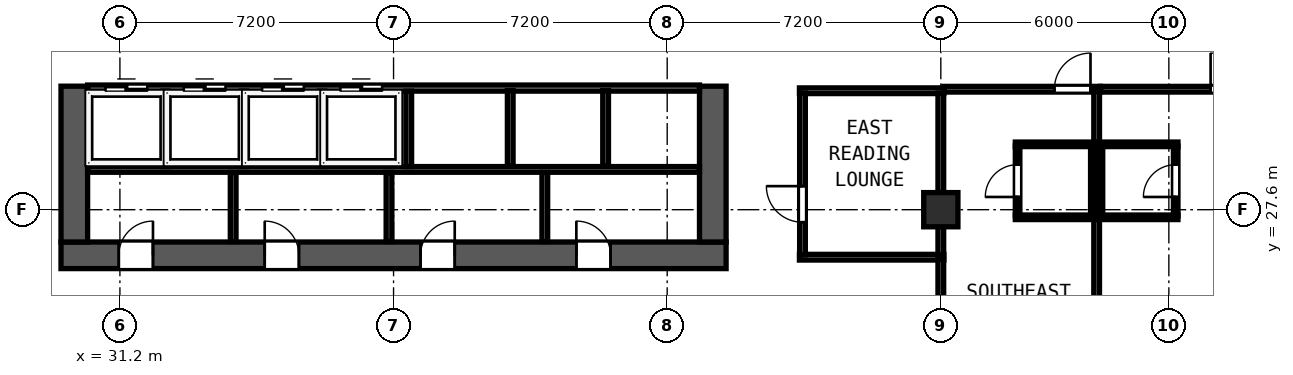
"""IFC4 building model, lengths in metres.
Left out: names, types, materials, properties, quantities, classifications, styles, units other than length and angle.
Written with IfcOpenShell. Run it as: python <this file> out.ifc"""

import sys

from ifc_helpers import new_model, si_unit, direction, frame, frame_2d, origin, origin_2d, place, context, subcontext, project, spatial, rectangle, hollow_rectangle, extrude, element, fill, save


model = new_model("IFC4")
c1 = context("Model", 3, precision=1e-05, world=origin(), true_north=direction((0.0, 1.0)))
c2 = subcontext(c1, "Body", "Model", "MODEL_VIEW")
j1 = project(units=[si_unit("LENGTHUNIT", "METRE"), si_unit("PLANEANGLEUNIT", "RADIAN")], contexts=[c1])
p1 = place(None, origin())
s1 = spatial("IfcSite", under=j1, at=p1, CompositionType="ELEMENT")
p2 = place(p1, origin())
s2 = spatial("IfcBuilding", under=s1, at=p2, CompositionType="ELEMENT")
p3 = place(p2, frame((0.0, 0.0, 152.4)))
s3 = spatial("IfcBuildingStorey", under=s2, at=p3, CompositionType="ELEMENT", Elevation=152.4)
p4 = place(p3, frame((29.65, 26.4, 0.0), z_axis=(0.0, 0.0, 1.0), x_axis=(1.0, 0.0, 0.0)))
e1 = element("IfcWall", 1, at=p4, inside=s3, PredefinedType="SHEAR", context=c2, shape_type="SweptSolid", body=[
    extrude(rectangle(XDim=17.5, YDim=0.7, at=frame_2d((8.75, 0.0))), origin(), (0.0, 0.0, 1.0), 3.6),
])
p5 = place(p4, frame((2.42, 0.0, 0.0), z_axis=(0.0, 0.0, 1.0), x_axis=(-1.0, 0.0, 0.0)))
e2 = element("IfcOpeningElement", 2, at=p5, cuts=e1, PredefinedType="OPENING", context=c2, shape_type="SweptSolid", body=[
    extrude(rectangle(XDim=0.9, YDim=2.1, at=frame_2d((0.45, 1.05))), frame((0.0, 0.36, 0.0), z_axis=(0.0, -1.0, 0.0), x_axis=(1.0, 0.0, 0.0)), (0.0, 0.0, 1.0), 0.72),
])
p6 = place(p4, frame((6.26, 0.0, 0.0), z_axis=(0.0, 0.0, 1.0), x_axis=(-1.0, 0.0, 0.0)))
e3 = element("IfcOpeningElement", 3, at=p6, cuts=e1, PredefinedType="OPENING", context=c2, shape_type="SweptSolid", body=[
    extrude(rectangle(XDim=0.9, YDim=2.1, at=frame_2d((0.45, 1.05))), frame((0.0, 0.36, 0.0), z_axis=(0.0, -1.0, 0.0), x_axis=(1.0, 0.0, 0.0)), (0.0, 0.0, 1.0), 0.72),
])
p7 = place(p4, frame((10.36, 0.0, 0.0), z_axis=(0.0, 0.0, 1.0), x_axis=(-1.0, 0.0, 0.0)))
e4 = element("IfcOpeningElement", 4, at=p7, cuts=e1, PredefinedType="OPENING", context=c2, shape_type="SweptSolid", body=[
    extrude(rectangle(XDim=0.9, YDim=2.1, at=frame_2d((0.45, 1.05))), frame((0.0, 0.36, 0.0), z_axis=(0.0, -1.0, 0.0), x_axis=(1.0, 0.0, 0.0)), (0.0, 0.0, 1.0), 0.72),
])
p8 = place(p4, frame((14.46, 0.0, 0.0), z_axis=(0.0, 0.0, 1.0), x_axis=(-1.0, 0.0, 0.0)))
e5 = element("IfcOpeningElement", 5, at=p8, cuts=e1, PredefinedType="OPENING", context=c2, shape_type="SweptSolid", body=[
    extrude(rectangle(XDim=0.9, YDim=2.1, at=frame_2d((0.45, 1.05))), frame((0.0, 0.36, 0.0), z_axis=(0.0, -1.0, 0.0), x_axis=(1.0, 0.0, 0.0)), (0.0, 0.0, 1.0), 0.72),
])
for number, where, z_axis, x_axis in (
    (6, (30.0, 26.75, 0.0), (0.0, 0.0, 1.0), (0.0, 1.0, 0.0)),
    (7, (46.8, 26.75, 0.0), (0.0, 0.0, 1.0), (0.0, 1.0, 0.0)),
):
    element("IfcWall", number, at=place(p3, frame(where, z_axis=z_axis, x_axis=x_axis)), inside=s3, PredefinedType="SHEAR", context=c2, shape_type="SweptSolid", body=[
        extrude(rectangle(XDim=4.1, YDim=0.7, at=frame_2d((2.05, 0.0))), origin(), (0.0, 0.0, 1.0), 3.6),
    ])
p9 = place(p3, frame((52.8, 27.6, 0.0), z_axis=(0.0, 0.0, 1.0), x_axis=(1.0, 0.0, 0.0)))
e8 = element("IfcColumn", 8, at=p9, inside=s3, PredefinedType="COLUMN", context=c2, shape_type="SweptSolid", body=[
    extrude(hollow_rectangle(XDim=0.9, YDim=0.9, WallThickness=0.034, at=origin_2d()), origin(), (0.0, 0.0, 1.0), 3.8),
])
p10 = place(p3, frame((30.35, 30.8, 0.0), z_axis=(0.0, 0.0, 1.0), x_axis=(1.0, 0.0, 0.0)))
e9 = element("IfcWall", 9, at=p10, inside=s3, PredefinedType="SOLIDWALL", context=c2, shape_type="SweptSolid", body=[
    extrude(rectangle(XDim=16.1, YDim=0.16, at=frame_2d((8.05, 0.0))), origin(), (0.0, 0.0, 1.0), 3.6),
])
p11 = place(p10, frame((0.47, 0.0, 0.0)))
e10 = element("IfcOpeningElement", 10, at=p11, cuts=e9, PredefinedType="OPENING", context=c2, shape_type="SweptSolid", body=[
    extrude(rectangle(XDim=1.1, YDim=2.2, at=frame_2d((0.55, 1.1))), frame((0.0, 0.09, 0.0), z_axis=(0.0, -1.0, 0.0), x_axis=(1.0, 0.0, 0.0)), (0.0, 0.0, 1.0), 0.18),
])
p12 = place(p10, frame((2.53, 0.0, 0.0)))
e11 = element("IfcOpeningElement", 11, at=p12, cuts=e9, PredefinedType="OPENING", context=c2, shape_type="SweptSolid", body=[
    extrude(rectangle(XDim=1.1, YDim=2.2, at=frame_2d((0.55, 1.1))), frame((0.0, 0.09, 0.0), z_axis=(0.0, -1.0, 0.0), x_axis=(1.0, 0.0, 0.0)), (0.0, 0.0, 1.0), 0.18),
])
p13 = place(p10, frame((4.59, 0.0, 0.0)))
e12 = element("IfcOpeningElement", 12, at=p13, cuts=e9, PredefinedType="OPENING", context=c2, shape_type="SweptSolid", body=[
    extrude(rectangle(XDim=1.1, YDim=2.2, at=frame_2d((0.55, 1.1))), frame((0.0, 0.09, 0.0), z_axis=(0.0, -1.0, 0.0), x_axis=(1.0, 0.0, 0.0)), (0.0, 0.0, 1.0), 0.18),
])
p14 = place(p10, frame((6.65, 0.0, 0.0)))
e13 = element("IfcOpeningElement", 13, at=p14, cuts=e9, PredefinedType="OPENING", context=c2, shape_type="SweptSolid", body=[
    extrude(rectangle(XDim=1.1, YDim=2.2, at=frame_2d((0.55, 1.1))), frame((0.0, 0.09, 0.0), z_axis=(0.0, -1.0, 0.0), x_axis=(1.0, 0.0, 0.0)), (0.0, 0.0, 1.0), 0.18),
])
p15 = place(p3, frame((30.35, 28.66, 0.0), z_axis=(0.0, 0.0, 1.0), x_axis=(1.0, 0.0, 0.0)))
e14 = element("IfcWall", 14, at=p15, inside=s3, PredefinedType="PARTITIONING", context=c2, shape_type="SweptSolid", body=[
    extrude(rectangle(XDim=16.1, YDim=0.15, at=frame_2d((8.05, 0.0))), origin(), (0.0, 0.0, 1.0), 3.6),
])
for number, where, z_axis, x_axis in (
    (15, (32.4, 28.735, 0.0), (0.0, 0.0, 1.0), (0.0, 1.0, 0.0)),
    (16, (34.46, 28.735, 0.0), (0.0, 0.0, 1.0), (0.0, 1.0, 0.0)),
    (17, (36.52, 28.735, 0.0), (0.0, 0.0, 1.0), (0.0, 1.0, 0.0)),
    (18, (38.8, 28.735, 0.0), (0.0, 0.0, 1.0), (0.0, 1.0, 0.0)),
):
    element("IfcWall", number, at=place(p3, frame(where, z_axis=z_axis, x_axis=x_axis)), inside=s3, PredefinedType="SOLIDWALL", context=c2, shape_type="SweptSolid", body=[
        extrude(rectangle(XDim=1.985, YDim=0.15, at=frame_2d((0.992, 0.0))), origin(), (0.0, 0.0, 1.0), 3.6),
    ])
for number, where, z_axis, x_axis in (
    (19, (34.18, 26.76, 0.0), (0.0, 0.0, 1.0), (0.0, 1.0, 0.0)),
    (20, (38.28, 26.76, 0.0), (0.0, 0.0, 1.0), (0.0, 1.0, 0.0)),
    (21, (42.38, 26.76, 0.0), (0.0, 0.0, 1.0), (0.0, 1.0, 0.0)),
):
    element("IfcWall", number, at=place(p3, frame(where, z_axis=z_axis, x_axis=x_axis)), inside=s3, PredefinedType="PARTITIONING", context=c2, shape_type="SweptSolid", body=[
        extrude(rectangle(XDim=1.82, YDim=0.15, at=frame_2d((0.91, 0.0))), origin(), (0.0, 0.0, 1.0), 3.6),
    ])
for number, where, z_axis, x_axis in (
    (22, (41.47, 28.75, 0.0), (0.0, 0.0, 1.0), (0.0, 1.0, 0.0)),
    (23, (43.98, 28.75, 0.0), (0.0, 0.0, 1.0), (0.0, 1.0, 0.0)),
):
    element("IfcWall", number, at=place(p3, frame(where, z_axis=z_axis, x_axis=x_axis)), inside=s3, PredefinedType="SOLIDWALL", context=c2, shape_type="SweptSolid", body=[
        extrude(rectangle(XDim=1.985, YDim=0.15, at=frame_2d((0.993, 0.0))), origin(), (0.0, 0.0, 1.0), 3.6),
    ])
for number, where, z_axis, x_axis in (
    (24, (49.08, 30.73, 0.0), (0.0, 0.0, 1.0), (1.0, 0.0, 0.0)),
    (25, (49.08, 26.35, 0.0), (0.0, 0.0, 1.0), (1.0, 0.0, 0.0)),
):
    element("IfcWall", number, at=place(p3, frame(where, z_axis=z_axis, x_axis=x_axis)), inside=s3, PredefinedType="PARTITIONING", context=c2, shape_type="SweptSolid", body=[
        extrude(rectangle(XDim=3.8, YDim=0.15, at=frame_2d((1.9, 0.0))), origin(), (0.0, 0.0, 1.0), 3.6),
    ])
p16 = place(p3, frame((49.16, 26.41, 0.0), z_axis=(0.0, 0.0, 1.0), x_axis=(0.0, 1.0, 0.0)))
e26 = element("IfcWall", 26, at=p16, inside=s3, PredefinedType="PARTITIONING", context=c2, shape_type="SweptSolid", body=[
    extrude(rectangle(XDim=4.26, YDim=0.15, at=frame_2d((2.13, 0.0))), origin(), (0.0, 0.0, 1.0), 3.6),
])
p17 = place(p16, frame((0.86, 0.0, 0.0)))
e27 = element("IfcOpeningElement", 27, at=p17, cuts=e26, PredefinedType="OPENING", context=c2, shape_type="SweptSolid", body=[
    extrude(rectangle(XDim=0.95, YDim=2.12, at=frame_2d((0.475, 1.06))), frame((0.0, 0.085, 0.0), z_axis=(0.0, -1.0, 0.0), x_axis=(1.0, 0.0, 0.0)), (0.0, 0.0, 1.0), 0.17),
])
p18 = place(p3, frame((52.8, 26.41, 0.0), z_axis=(0.0, 0.0, 1.0), x_axis=(0.0, 1.0, 0.0)))
e28 = element("IfcWall", 28, at=p18, inside=s3, PredefinedType="PARTITIONING", context=c2, shape_type="SweptSolid", body=[
    extrude(rectangle(XDim=4.26, YDim=0.15, at=frame_2d((2.13, 0.0))), origin(), (0.0, 0.0, 1.0), 3.145),
])
p19 = place(p3, frame((52.882, 30.77, 0.0), z_axis=(0.0, 0.0, 1.0), x_axis=(1.0, 0.0, 0.0)))
e29 = element("IfcWall", 29, at=p19, inside=s3, PredefinedType="PARTITIONING", context=c2, shape_type="SweptSolid", body=[
    extrude(rectangle(XDim=4.118, YDim=0.15, at=frame_2d((2.059, 0.0))), origin(), (0.0, 0.0, 1.0), 3.6),
])
p20 = place(p19, frame((3.856, 0.0, 0.0), z_axis=(0.0, 0.0, 1.0), x_axis=(-1.0, 0.0, 0.0)))
e30 = element("IfcOpeningElement", 30, at=p20, cuts=e29, PredefinedType="OPENING", context=c2, shape_type="SweptSolid", body=[
    extrude(rectangle(XDim=0.95, YDim=2.15, at=frame_2d((0.475, 1.075))), frame((0.0, 0.085, 0.0), z_axis=(0.0, -1.0, 0.0), x_axis=(1.0, 0.0, 0.0)), (0.0, 0.0, 1.0), 0.17),
])
p21 = place(p3, frame((52.8, 21.819, 0.0), z_axis=(0.0, 0.0, 1.0), x_axis=(0.0, 1.0, 0.0)))
e31 = element("IfcWall", 31, at=p21, inside=s3, PredefinedType="PARTITIONING", context=c2, shape_type="SweptSolid", body=[
    extrude(rectangle(XDim=4.471, YDim=0.15, at=frame_2d((2.236, 0.0))), origin(), (0.0, 0.0, 1.0), 3.145),
])
p22 = place(p3, frame((56.9, 18.925, 0.0), z_axis=(0.0, 0.0, 1.0), x_axis=(0.0, 1.0, 0.0)))
e32 = element("IfcWall", 32, at=p22, inside=s3, PredefinedType="PARTITIONING", context=c2, shape_type="SweptSolid", body=[
    extrude(rectangle(XDim=11.785, YDim=0.15, at=frame_2d((5.892, 0.0))), origin(), (0.0, 0.0, 1.0), 3.6),
])
p23 = place(p3, frame((54.76, 29.32, 0.0), z_axis=(0.0, 0.0, 1.0), x_axis=(1.0, 0.0, 0.0)))
e33 = element("IfcWall", 33, at=p23, inside=s3, PredefinedType="PARTITIONING", context=c2, shape_type="SweptSolid", body=[
    extrude(rectangle(XDim=2.08, YDim=0.12, at=frame_2d((1.04, 0.0))), origin(), (0.0, 0.0, 1.0), 3.6),
])
p24 = place(p3, frame((54.76, 27.4, 0.0), z_axis=(0.0, 0.0, 1.0), x_axis=(1.0, 0.0, 0.0)))
e34 = element("IfcWall", 34, at=p24, inside=s3, PredefinedType="PARTITIONING", context=c2, shape_type="SweptSolid", body=[
    extrude(rectangle(XDim=2.08, YDim=0.12, at=frame_2d((1.04, 0.0))), origin(), (0.0, 0.0, 1.0), 3.145),
])
p25 = place(p3, frame((54.82, 27.445, 0.0), z_axis=(0.0, 0.0, 1.0), x_axis=(0.0, 1.0, 0.0)))
e35 = element("IfcWall", 35, at=p25, inside=s3, PredefinedType="PARTITIONING", context=c2, shape_type="SweptSolid", body=[
    extrude(rectangle(XDim=1.83, YDim=0.12, at=frame_2d((0.915, 0.0))), origin(), (0.0, 0.0, 1.0), 3.6),
])
p26 = place(p25, frame((1.34, 0.0, 0.0), z_axis=(0.0, 0.0, 1.0), x_axis=(-1.0, 0.0, 0.0)))
e36 = element("IfcOpeningElement", 36, at=p26, cuts=e35, PredefinedType="OPENING", context=c2, shape_type="SweptSolid", body=[
    extrude(rectangle(XDim=0.85, YDim=2.1, at=frame_2d((0.425, 1.05))), frame((0.0, 0.07, 0.0), z_axis=(0.0, -1.0, 0.0), x_axis=(1.0, 0.0, 0.0)), (0.0, 0.0, 1.0), 0.14),
])
p27 = place(p3, frame((56.8, 27.445, 0.0), z_axis=(0.0, 0.0, 1.0), x_axis=(0.0, 1.0, 0.0)))
e37 = element("IfcWall", 37, at=p27, inside=s3, PredefinedType="PARTITIONING", context=c2, shape_type="SweptSolid", body=[
    extrude(rectangle(XDim=1.83, YDim=0.12, at=frame_2d((0.915, 0.0))), origin(), (0.0, 0.0, 1.0), 3.6),
])
p28 = place(p3, frame((57.002, 30.77, 0.0), z_axis=(0.0, 0.0, 1.0), x_axis=(1.0, 0.0, 0.0)))
e38 = element("IfcWall", 38, at=p28, inside=s3, PredefinedType="PARTITIONING", context=c2, shape_type="SweptSolid", body=[
    extrude(rectangle(XDim=4.108, YDim=0.15, at=frame_2d((2.054, 0.0))), origin(), (0.0, 0.0, 1.0), 3.6),
])
p29 = place(p28, frame((3.846, 0.0, 0.0), z_axis=(0.0, 0.0, 1.0), x_axis=(-1.0, 0.0, 0.0)))
e39 = element("IfcOpeningElement", 39, at=p29, cuts=e38, PredefinedType="OPENING", context=c2, shape_type="SweptSolid", body=[
    extrude(rectangle(XDim=0.95, YDim=2.15, at=frame_2d((0.475, 1.075))), frame((0.0, 0.085, 0.0), z_axis=(0.0, -1.0, 0.0), x_axis=(1.0, 0.0, 0.0)), (0.0, 0.0, 1.0), 0.17),
])
p30 = place(p3, frame((56.96, 29.32, 0.0), z_axis=(0.0, 0.0, 1.0), x_axis=(1.0, 0.0, 0.0)))
e40 = element("IfcWall", 40, at=p30, inside=s3, PredefinedType="PARTITIONING", context=c2, shape_type="SweptSolid", body=[
    extrude(rectangle(XDim=2.08, YDim=0.12, at=frame_2d((1.04, 0.0))), origin(), (0.0, 0.0, 1.0), 3.6),
])
p31 = place(p3, frame((56.96, 27.4, 0.0), z_axis=(0.0, 0.0, 1.0), x_axis=(1.0, 0.0, 0.0)))
e41 = element("IfcWall", 41, at=p31, inside=s3, PredefinedType="PARTITIONING", context=c2, shape_type="SweptSolid", body=[
    extrude(rectangle(XDim=2.08, YDim=0.12, at=frame_2d((1.04, 0.0))), origin(), (0.0, 0.0, 1.0), 3.145),
])
p32 = place(p3, frame((57.0, 27.445, 0.0), z_axis=(0.0, 0.0, 1.0), x_axis=(0.0, 1.0, 0.0)))
e42 = element("IfcWall", 42, at=p32, inside=s3, PredefinedType="PARTITIONING", context=c2, shape_type="SweptSolid", body=[
    extrude(rectangle(XDim=1.83, YDim=0.12, at=frame_2d((0.915, 0.0))), origin(), (0.0, 0.0, 1.0), 3.6),
])
p33 = place(p3, frame((58.98, 27.445, 0.0), z_axis=(0.0, 0.0, 1.0), x_axis=(0.0, 1.0, 0.0)))
e43 = element("IfcWall", 43, at=p33, inside=s3, PredefinedType="PARTITIONING", context=c2, shape_type="SweptSolid", body=[
    extrude(rectangle(XDim=1.83, YDim=0.12, at=frame_2d((0.915, 0.0))), origin(), (0.0, 0.0, 1.0), 3.6),
])
p34 = place(p33, frame((0.49, 0.0, 0.0)))
e44 = element("IfcOpeningElement", 44, at=p34, cuts=e43, PredefinedType="OPENING", context=c2, shape_type="SweptSolid", body=[
    extrude(rectangle(XDim=0.85, YDim=2.1, at=frame_2d((0.425, 1.05))), frame((0.0, 0.07, 0.0), z_axis=(0.0, -1.0, 0.0), x_axis=(1.0, 0.0, 0.0)), (0.0, 0.0, 1.0), 0.14),
])
p35 = place(p11, origin())
e45 = element("IfcDoor", 45, at=p35, inside=s3, OperationType="SLIDING_TO_LEFT", PredefinedType="DOOR", context=c2, shape_type="SweptSolid", body=[
    extrude(rectangle(XDim=1.1, YDim=2.2, at=frame_2d((0.55, 1.1))), frame((0.0, 0.025, 0.0), z_axis=(0.0, -1.0, 0.0), x_axis=(1.0, 0.0, 0.0)), (0.0, 0.0, 1.0), 0.05),
])
fill(e10, e45)
p36 = place(p12, origin())
e46 = element("IfcDoor", 46, at=p36, inside=s3, OperationType="SLIDING_TO_LEFT", PredefinedType="DOOR", context=c2, shape_type="SweptSolid", body=[
    extrude(rectangle(XDim=1.1, YDim=2.2, at=frame_2d((0.55, 1.1))), frame((0.0, 0.025, 0.0), z_axis=(0.0, -1.0, 0.0), x_axis=(1.0, 0.0, 0.0)), (0.0, 0.0, 1.0), 0.05),
])
fill(e11, e46)
p37 = place(p13, origin())
e47 = element("IfcDoor", 47, at=p37, inside=s3, OperationType="SLIDING_TO_LEFT", PredefinedType="DOOR", context=c2, shape_type="SweptSolid", body=[
    extrude(rectangle(XDim=1.1, YDim=2.2, at=frame_2d((0.55, 1.1))), frame((0.0, 0.025, 0.0), z_axis=(0.0, -1.0, 0.0), x_axis=(1.0, 0.0, 0.0)), (0.0, 0.0, 1.0), 0.05),
])
fill(e12, e47)
p38 = place(p14, origin())
e48 = element("IfcDoor", 48, at=p38, inside=s3, OperationType="SLIDING_TO_LEFT", PredefinedType="DOOR", context=c2, shape_type="SweptSolid", body=[
    extrude(rectangle(XDim=1.1, YDim=2.2, at=frame_2d((0.55, 1.1))), frame((0.0, 0.025, 0.0), z_axis=(0.0, -1.0, 0.0), x_axis=(1.0, 0.0, 0.0)), (0.0, 0.0, 1.0), 0.05),
])
fill(e13, e48)
p39 = place(p5, origin())
e49 = element("IfcDoor", 49, at=p39, inside=s3, OperationType="SINGLE_SWING_LEFT", PredefinedType="DOOR", context=c2, shape_type="SweptSolid", body=[
    extrude(rectangle(XDim=0.9, YDim=2.1, at=frame_2d((0.45, 1.05))), frame((0.0, -0.195, 0.0), z_axis=(0.0, -1.0, 0.0), x_axis=(1.0, 0.0, 0.0)), (0.0, 0.0, 1.0), 0.05),
])
fill(e2, e49)
p40 = place(p6, origin())
e50 = element("IfcDoor", 50, at=p40, inside=s3, OperationType="SINGLE_SWING_RIGHT", PredefinedType="DOOR", context=c2, shape_type="SweptSolid", body=[
    extrude(rectangle(XDim=0.9, YDim=2.1, at=frame_2d((0.45, 1.05))), frame((0.0, -0.195, 0.0), z_axis=(0.0, -1.0, 0.0), x_axis=(1.0, 0.0, 0.0)), (0.0, 0.0, 1.0), 0.05),
])
fill(e3, e50)
p41 = place(p7, origin())
e51 = element("IfcDoor", 51, at=p41, inside=s3, OperationType="SINGLE_SWING_LEFT", PredefinedType="DOOR", context=c2, shape_type="SweptSolid", body=[
    extrude(rectangle(XDim=0.9, YDim=2.1, at=frame_2d((0.45, 1.05))), frame((0.0, -0.195, 0.0), z_axis=(0.0, -1.0, 0.0), x_axis=(1.0, 0.0, 0.0)), (0.0, 0.0, 1.0), 0.05),
])
fill(e4, e51)
p42 = place(p8, origin())
e52 = element("IfcDoor", 52, at=p42, inside=s3, OperationType="SINGLE_SWING_RIGHT", PredefinedType="DOOR", context=c2, shape_type="SweptSolid", body=[
    extrude(rectangle(XDim=0.9, YDim=2.1, at=frame_2d((0.45, 1.05))), frame((0.0, -0.195, 0.0), z_axis=(0.0, -1.0, 0.0), x_axis=(1.0, 0.0, 0.0)), (0.0, 0.0, 1.0), 0.05),
])
fill(e5, e52)
p43 = place(p17, origin())
e53 = element("IfcDoor", 53, at=p43, inside=s3, OperationType="SINGLE_SWING_RIGHT", PredefinedType="DOOR", context=c2, shape_type="SweptSolid", body=[
    extrude(rectangle(XDim=0.95, YDim=2.12, at=frame_2d((0.475, 1.06))), frame((0.0, 0.025, 0.0), z_axis=(0.0, -1.0, 0.0), x_axis=(1.0, 0.0, 0.0)), (0.0, 0.0, 1.0), 0.05),
])
fill(e27, e53)
p44 = place(p20, origin())
e54 = element("IfcDoor", 54, at=p44, inside=s3, OperationType="SINGLE_SWING_LEFT", PredefinedType="DOOR", context=c2, shape_type="SweptSolid", body=[
    extrude(rectangle(XDim=0.95, YDim=2.15, at=frame_2d((0.475, 1.075))), frame((0.0, 0.025, 0.0), z_axis=(0.0, -1.0, 0.0), x_axis=(1.0, 0.0, 0.0)), (0.0, 0.0, 1.0), 0.05),
])
fill(e30, e54)
p45 = place(p26, origin())
e55 = element("IfcDoor", 55, at=p45, inside=s3, OperationType="SINGLE_SWING_RIGHT", PredefinedType="DOOR", context=c2, shape_type="SweptSolid", body=[
    extrude(rectangle(XDim=0.85, YDim=2.1, at=frame_2d((0.425, 1.05))), frame((0.0, 0.025, 0.0), z_axis=(0.0, -1.0, 0.0), x_axis=(1.0, 0.0, 0.0)), (0.0, 0.0, 1.0), 0.05),
])
fill(e36, e55)
p46 = place(p29, origin())
e56 = element("IfcDoor", 56, at=p46, inside=s3, OperationType="SINGLE_SWING_RIGHT", PredefinedType="DOOR", context=c2, shape_type="SweptSolid", body=[
    extrude(rectangle(XDim=0.95, YDim=2.15, at=frame_2d((0.475, 1.075))), frame((0.0, 0.025, 0.0), z_axis=(0.0, -1.0, 0.0), x_axis=(1.0, 0.0, 0.0)), (0.0, 0.0, 1.0), 0.05),
])
fill(e39, e56)
p47 = place(p34, origin())
e57 = element("IfcDoor", 57, at=p47, inside=s3, OperationType="SINGLE_SWING_LEFT", PredefinedType="DOOR", context=c2, shape_type="SweptSolid", body=[
    extrude(rectangle(XDim=0.85, YDim=2.1, at=frame_2d((0.425, 1.05))), frame((0.0, 0.025, 0.0), z_axis=(0.0, -1.0, 0.0), x_axis=(1.0, 0.0, 0.0)), (0.0, 0.0, 1.0), 0.05),
])
fill(e44, e57)
save(model, sys.argv[1])
